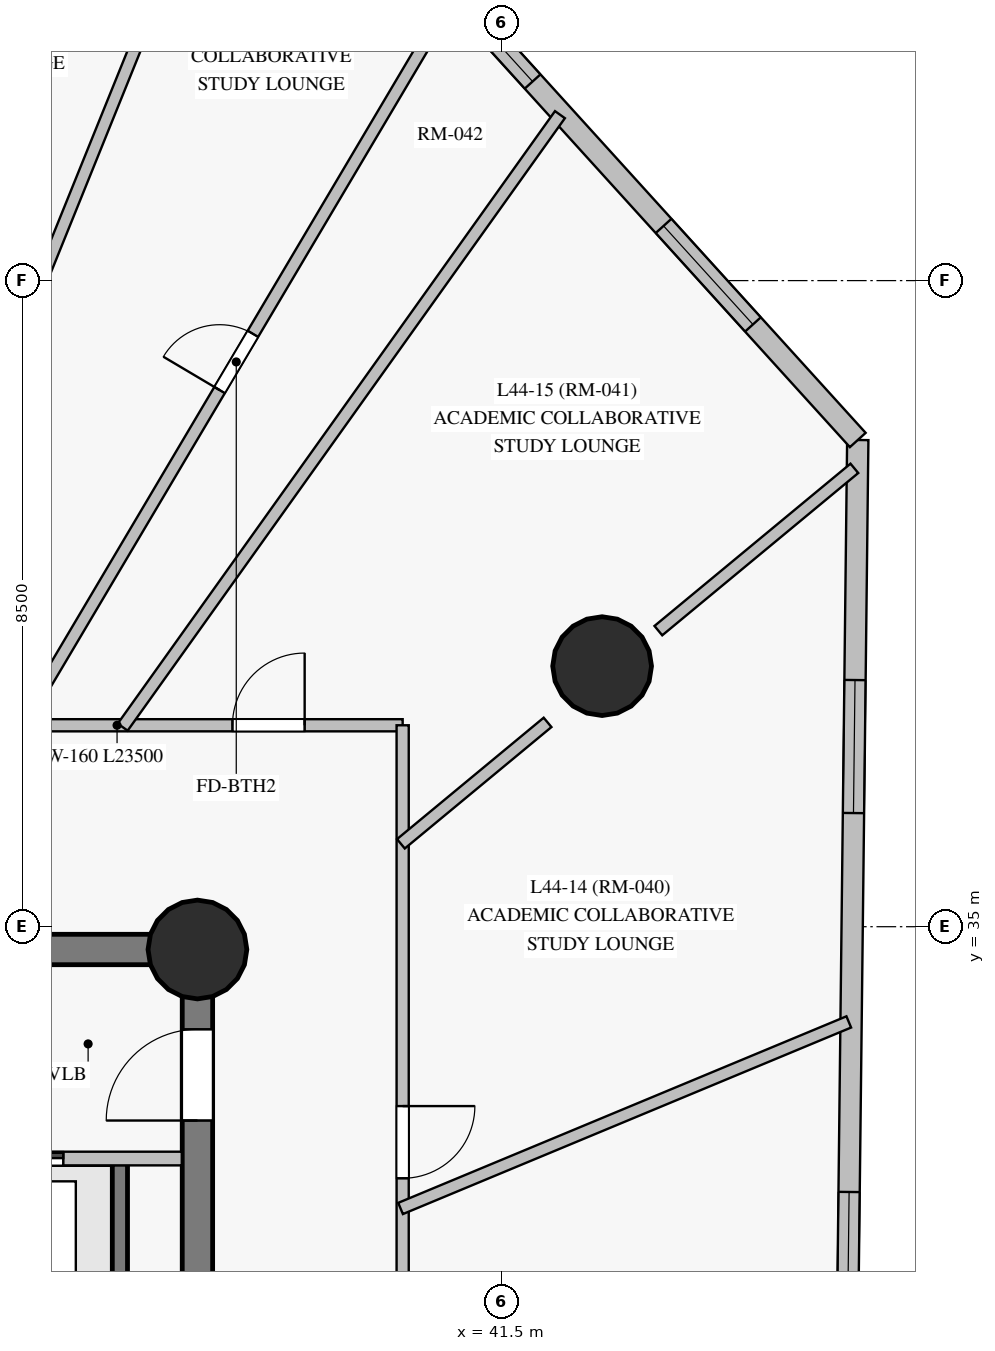
"""IFC4 building model, lengths in metres.
Left out: names, types, materials, properties, quantities, classifications, styles, units other than length and angle.
Written with IfcOpenShell. Run it as: python <this file> out.ifc"""

import sys

from ifc_helpers import new_model, si_unit, direction, frame, frame_2d, origin, origin_with_axes, origin_2d, place, context, subcontext, project, spatial, rectangle, circle, extrude, source, transform, mapped, element, fill, save


model = new_model("IFC4")
c1 = context("Model", 3, precision=1e-05, world=origin(), true_north=direction((0.0, 1.0)))
c2 = subcontext(c1, "Body", "Model", "MODEL_VIEW")
j1 = project(units=[si_unit("LENGTHUNIT", "METRE"), si_unit("PLANEANGLEUNIT", "RADIAN")], contexts=[c1])
p1 = place(None, origin())
s1 = spatial("IfcSite", under=j1, at=p1, CompositionType="ELEMENT")
p2 = place(p1, origin())
s2 = spatial("IfcBuilding", under=s1, at=p2, CompositionType="ELEMENT")
p3 = place(p2, frame((0.0, 0.0, 156.55)))
s3 = spatial("IfcBuildingStorey", under=s2, at=p3, CompositionType="ELEMENT", Elevation=156.55)
p4 = place(p3, frame((37.5, 18.3, 0.0), z_axis=(0.0, 0.0, 1.0), x_axis=(0.0, 1.0, 0.0)))
e1 = element("IfcWall", 1, at=p4, inside=s3, PredefinedType="SHEAR", context=c2, shape_type="SweptSolid", body=[
    extrude(rectangle(XDim=16.4, YDim=0.4, at=frame_2d((8.2, 0.0))), origin(), (0.0, 0.0, 1.0), 2.825),
])
p5 = place(p4, frame((14.15, 0.0, 0.0)))
e2 = element("IfcOpeningElement", 2, at=p5, cuts=e1, PredefinedType="OPENING", context=c2, shape_type="SweptSolid", body=[
    extrude(rectangle(XDim=1.2, YDim=2.15, at=frame_2d((0.6, 1.075))), frame((0.0, 0.21, 0.0), z_axis=(0.0, -1.0, 0.0), x_axis=(1.0, 0.0, 0.0)), (0.0, 0.0, 1.0), 0.42),
])
p6 = place(p3, frame((37.5, 34.7, 0.0), z_axis=(0.0, 0.0, 1.0), x_axis=(-1.0, 0.0, 0.0)))
e3 = element("IfcWall", 3, at=p6, inside=s3, PredefinedType="SHEAR", context=c2, shape_type="SweptSolid", body=[
    extrude(rectangle(XDim=10.95, YDim=0.4, at=frame_2d((5.475, 0.0))), origin(), (0.0, 0.0, 1.0), 2.825),
])
p7 = place(p6, frame((2.15, 0.0, 0.0)))
e4 = element("IfcOpeningElement", 4, at=p7, cuts=e3, PredefinedType="OPENING", context=c2, shape_type="SweptSolid", body=[
    extrude(rectangle(XDim=1.2, YDim=2.15, at=frame_2d((0.6, 1.075))), frame((0.0, 0.21, 0.0), z_axis=(0.0, -1.0, 0.0), x_axis=(1.0, 0.0, 0.0)), (0.0, 0.0, 1.0), 0.42),
])
p8 = place(p6, frame((6.35, 0.0, 0.0)))
e5 = element("IfcOpeningElement", 5, at=p8, cuts=e3, PredefinedType="OPENING", context=c2, shape_type="SweptSolid", body=[
    extrude(rectangle(XDim=1.1, YDim=2.15, at=frame_2d((0.55, 1.075))), frame((0.0, 0.21, 0.0), z_axis=(0.0, -1.0, 0.0), x_axis=(1.0, 0.0, 0.0)), (0.0, 0.0, 1.0), 0.42),
])
m1 = source(origin_with_axes(), c2, "Body", "SweptSolid", [
    extrude(circle(Radius=0.65, at=origin_2d()), origin(), (0.0, 0.0, 1.0), 3.05),
])
for number, where, z_axis, x_axis in (
    (6, (37.5, 34.7, 0.0), (0.0, 0.0, 1.0), (1.0, 0.0, 0.0)),
    (7, (42.824, 38.428, 0.0), (0.0, 0.0, 1.0), (1.0, 0.0, 0.0)),
):
    element("IfcColumn", number, at=place(p3, frame(where, z_axis=z_axis, x_axis=x_axis)), inside=s3, PredefinedType="COLUMN", context=c2, shape_type="MappedRepresentation", body=[
        mapped(m1, transform((0.0, 0.0, 0.0), scale=1.0)),
    ])
p9 = place(p3, frame((46.027, 27.477, 0.0), z_axis=(0.0, 0.0, 1.0), x_axis=(0.011517670731, 0.999933669431, 0.0)))
e8 = element("IfcWall", 8, at=p9, inside=s3, PredefinedType="SOLIDWALL", context=c2, shape_type="SweptSolid", body=[
    extrude(rectangle(XDim=13.927, YDim=0.28, at=frame_2d((6.963, 0.0))), origin(), (0.0, 0.0, 1.0), 2.825),
])
p10 = place(p9, frame((2.283, 0.0, 0.85)))
e9 = element("IfcOpeningElement", 9, at=p10, cuts=e8, PredefinedType="OPENING", context=c2, shape_type="SweptSolid", body=[
    extrude(rectangle(XDim=1.75, YDim=1.65, at=frame_2d((0.875, 0.825))), frame((0.0, 0.15, 0.0), z_axis=(0.0, -1.0, 0.0), x_axis=(1.0, 0.0, 0.0)), (0.0, 0.0, 1.0), 0.3),
])
p11 = place(p9, frame((9.018, 0.0, 0.85)))
e10 = element("IfcOpeningElement", 10, at=p11, cuts=e8, PredefinedType="OPENING", context=c2, shape_type="SweptSolid", body=[
    extrude(rectangle(XDim=1.75, YDim=1.65, at=frame_2d((0.875, 0.825))), frame((0.0, 0.15, 0.0), z_axis=(0.0, -1.0, 0.0), x_axis=(1.0, 0.0, 0.0)), (0.0, 0.0, 1.0), 0.3),
])
p12 = place(p3, frame((46.188, 41.403, 0.0), z_axis=(0.0, 0.0, 1.0), x_axis=(-0.671855500446, 0.740682243962, 0.0)))
e11 = element("IfcWall", 11, at=p12, inside=s3, PredefinedType="SOLIDWALL", context=c2, shape_type="SweptSolid", body=[
    extrude(rectangle(XDim=9.446, YDim=0.28, at=frame_2d((4.723, 0.0))), origin(), (0.0, 0.0, 1.0), 2.825),
])
p13 = place(p12, frame((2.053, 0.0, 0.85)))
e12 = element("IfcOpeningElement", 12, at=p13, cuts=e11, PredefinedType="OPENING", context=c2, shape_type="SweptSolid", body=[
    extrude(rectangle(XDim=1.75, YDim=1.65, at=frame_2d((0.875, 0.825))), frame((0.0, 0.15, 0.0), z_axis=(0.0, -1.0, 0.0), x_axis=(1.0, 0.0, 0.0)), (0.0, 0.0, 1.0), 0.3),
])
p14 = place(p12, frame((6.368, 0.0, 0.85)))
e13 = element("IfcOpeningElement", 13, at=p14, cuts=e11, PredefinedType="OPENING", context=c2, shape_type="SweptSolid", body=[
    extrude(rectangle(XDim=0.95, YDim=1.5, at=frame_2d((0.475, 0.75))), frame((0.0, 0.15, 0.0), z_axis=(0.0, -1.0, 0.0), x_axis=(1.0, 0.0, 0.0)), (0.0, 0.0, 1.0), 0.3),
])
p15 = place(p3, frame((36.48, 29.02, 0.0), z_axis=(0.0, 0.0, 1.0), x_axis=(0.0, 1.0, 0.0)))
e14 = element("IfcWall", 14, at=p15, inside=s3, PredefinedType="SHEAR", context=c2, shape_type="SweptSolid", body=[
    extrude(rectangle(XDim=2.86, YDim=0.2, at=frame_2d((1.43, 0.0))), origin(), (0.0, 0.0, 1.0), 2.825),
])
p16 = place(p3, frame((16.7, 37.65, 0.0), z_axis=(0.0, 0.0, 1.0), x_axis=(1.0, 0.0, 0.0)))
e15 = element("IfcWall", 15, at=p16, inside=s3, PredefinedType="PARTITIONING", context=c2, shape_type="SweptSolid", body=[
    extrude(rectangle(XDim=23.5, YDim=0.16, at=frame_2d((11.75, 0.0))), origin(), (0.0, 0.0, 1.0), 2.375),
])
p17 = place(p16, frame((21.26, 0.0, 0.0)))
e16 = element("IfcOpeningElement", 16, at=p17, cuts=e15, PredefinedType="OPENING", context=c2, shape_type="SweptSolid", body=[
    extrude(rectangle(XDim=0.95, YDim=2.15, at=frame_2d((0.475, 1.075))), frame((0.0, 0.09, 0.0), z_axis=(0.0, -1.0, 0.0), x_axis=(1.0, 0.0, 0.0)), (0.0, 0.0, 1.0), 0.18),
])
p18 = place(p16, frame((17.365, 0.0, 0.0)))
e17 = element("IfcOpeningElement", 17, at=p18, cuts=e15, PredefinedType="OPENING", context=c2, shape_type="SweptSolid", body=[
    extrude(rectangle(XDim=0.86, YDim=2.1, at=frame_2d((0.43, 1.05))), frame((0.0, 0.09, 0.0), z_axis=(0.0, -1.0, 0.0), x_axis=(1.0, 0.0, 0.0)), (0.0, 0.0, 1.0), 0.18),
])
p19 = place(p16, frame((15.16, 0.0, 0.0)))
e18 = element("IfcOpeningElement", 18, at=p19, cuts=e15, PredefinedType="OPENING", context=c2, shape_type="SweptSolid", body=[
    extrude(rectangle(XDim=0.95, YDim=2.15, at=frame_2d((0.475, 1.075))), frame((0.0, 0.09, 0.0), z_axis=(0.0, -1.0, 0.0), x_axis=(1.0, 0.0, 0.0)), (0.0, 0.0, 1.0), 0.18),
])
p20 = place(p16, frame((13.06, 0.0, 0.0)))
e19 = element("IfcOpeningElement", 19, at=p20, cuts=e15, PredefinedType="OPENING", context=c2, shape_type="SweptSolid", body=[
    extrude(rectangle(XDim=0.95, YDim=2.15, at=frame_2d((0.475, 1.075))), frame((0.0, 0.09, 0.0), z_axis=(0.0, -1.0, 0.0), x_axis=(1.0, 0.0, 0.0)), (0.0, 0.0, 1.0), 0.18),
])
p21 = place(p16, frame((10.973, 0.0, 0.0)))
e20 = element("IfcOpeningElement", 20, at=p21, cuts=e15, PredefinedType="OPENING", context=c2, shape_type="SweptSolid", body=[
    extrude(rectangle(XDim=0.95, YDim=2.15, at=frame_2d((0.475, 1.075))), frame((0.0, 0.09, 0.0), z_axis=(0.0, -1.0, 0.0), x_axis=(1.0, 0.0, 0.0)), (0.0, 0.0, 1.0), 0.18),
])
p22 = place(p16, frame((8.885, 0.0, 0.0)))
e21 = element("IfcOpeningElement", 21, at=p22, cuts=e15, PredefinedType="OPENING", context=c2, shape_type="SweptSolid", body=[
    extrude(rectangle(XDim=0.95, YDim=2.15, at=frame_2d((0.475, 1.075))), frame((0.0, 0.09, 0.0), z_axis=(0.0, -1.0, 0.0), x_axis=(1.0, 0.0, 0.0)), (0.0, 0.0, 1.0), 0.18),
])
p23 = place(p16, frame((6.51, 0.0, 0.0)))
e22 = element("IfcOpeningElement", 22, at=p23, cuts=e15, PredefinedType="OPENING", context=c2, shape_type="SweptSolid", body=[
    extrude(rectangle(XDim=0.95, YDim=2.15, at=frame_2d((0.475, 1.075))), frame((0.0, 0.09, 0.0), z_axis=(0.0, -1.0, 0.0), x_axis=(1.0, 0.0, 0.0)), (0.0, 0.0, 1.0), 0.18),
])
p24 = place(p16, frame((3.96, 0.0, 0.0)))
e23 = element("IfcOpeningElement", 23, at=p24, cuts=e15, PredefinedType="OPENING", context=c2, shape_type="SweptSolid", body=[
    extrude(rectangle(XDim=0.95, YDim=2.15, at=frame_2d((0.475, 1.075))), frame((0.0, 0.09, 0.0), z_axis=(0.0, -1.0, 0.0), x_axis=(1.0, 0.0, 0.0)), (0.0, 0.0, 1.0), 0.18),
])
p25 = place(p16, frame((2.364, 0.0, 0.0)))
e24 = element("IfcOpeningElement", 24, at=p25, cuts=e15, PredefinedType="OPENING", context=c2, shape_type="SweptSolid", body=[
    extrude(rectangle(XDim=0.95, YDim=2.15, at=frame_2d((0.475, 1.075))), frame((0.0, 0.09, 0.0), z_axis=(0.0, -1.0, 0.0), x_axis=(1.0, 0.0, 0.0)), (0.0, 0.0, 1.0), 0.18),
])
p26 = place(p3, frame((40.2, 37.65, 0.0), z_axis=(0.0, 0.0, 1.0), x_axis=(0.0, -1.0, 0.0)))
e25 = element("IfcWall", 25, at=p26, inside=s3, PredefinedType="PARTITIONING", context=c2, shape_type="SweptSolid", body=[
    extrude(rectangle(XDim=22.3, YDim=0.16, at=frame_2d((11.15, 0.0))), origin(), (0.0, 0.0, 1.0), 2.375),
])
p27 = place(p26, frame((16.25, 0.0, 0.0)))
e26 = element("IfcOpeningElement", 26, at=p27, cuts=e25, PredefinedType="OPENING", context=c2, shape_type="SweptSolid", body=[
    extrude(rectangle(XDim=0.95, YDim=2.15, at=frame_2d((0.475, 1.075))), frame((0.0, 0.09, 0.0), z_axis=(0.0, -1.0, 0.0), x_axis=(1.0, 0.0, 0.0)), (0.0, 0.0, 1.0), 0.18),
])
p28 = place(p26, frame((11.115, 0.0, 0.0)))
e27 = element("IfcOpeningElement", 27, at=p28, cuts=e25, PredefinedType="OPENING", context=c2, shape_type="SweptSolid", body=[
    extrude(rectangle(XDim=0.95, YDim=2.15, at=frame_2d((0.475, 1.075))), frame((0.0, 0.09, 0.0), z_axis=(0.0, -1.0, 0.0), x_axis=(1.0, 0.0, 0.0)), (0.0, 0.0, 1.0), 0.18),
])
p29 = place(p26, frame((7.33, 0.0, 0.0)))
e28 = element("IfcOpeningElement", 28, at=p29, cuts=e25, PredefinedType="OPENING", context=c2, shape_type="SweptSolid", body=[
    extrude(rectangle(XDim=0.95, YDim=2.15, at=frame_2d((0.475, 1.075))), frame((0.0, 0.09, 0.0), z_axis=(0.0, -1.0, 0.0), x_axis=(1.0, 0.0, 0.0)), (0.0, 0.0, 1.0), 0.18),
])
p30 = place(p26, frame((5.01, 0.0, 0.0)))
e29 = element("IfcOpeningElement", 29, at=p30, cuts=e25, PredefinedType="OPENING", context=c2, shape_type="SweptSolid", body=[
    extrude(rectangle(XDim=0.95, YDim=2.15, at=frame_2d((0.475, 1.075))), frame((0.0, 0.09, 0.0), z_axis=(0.0, -1.0, 0.0), x_axis=(1.0, 0.0, 0.0)), (0.0, 0.0, 1.0), 0.18),
])
p31 = place(p3, frame((33.059, 37.608, 0.0), z_axis=(0.0, 0.0, 1.0), x_axis=(0.375079467642, 0.926992660679, 0.0)))
e30 = element("IfcWall", 30, at=p31, inside=s3, PredefinedType="PARTITIONING", context=c2, shape_type="SweptSolid", body=[
    extrude(rectangle(XDim=11.904, YDim=0.16, at=frame_2d((5.952, 0.0))), origin(), (0.0, 0.0, 1.0), 2.825),
])
p32 = place(p3, frame((35.163, 37.624, 0.0), z_axis=(0.0, 0.0, 1.0), x_axis=(0.509838328303, 0.860270236026, 0.0)))
e31 = element("IfcWall", 31, at=p32, inside=s3, PredefinedType="PARTITIONING", context=c2, shape_type="SweptSolid", body=[
    extrude(rectangle(XDim=11.173, YDim=0.16, at=frame_2d((5.586, 0.0))), origin(), (0.0, 0.0, 1.0), 2.825),
])
p33 = place(p32, frame((5.156, 0.0, 0.0)))
e32 = element("IfcOpeningElement", 32, at=p33, cuts=e31, PredefinedType="OPENING", context=c2, shape_type="SweptSolid", body=[
    extrude(rectangle(XDim=0.86, YDim=2.04, at=frame_2d((0.43, 1.02))), frame((0.0, 0.09, 0.0), z_axis=(0.0, -1.0, 0.0), x_axis=(1.0, 0.0, 0.0)), (0.0, 0.0, 1.0), 0.18),
])
p34 = place(p3, frame((36.517, 37.625, 0.0), z_axis=(0.0, 0.0, 1.0), x_axis=(0.581053898372, 0.813865079228, 0.0)))
e33 = element("IfcWall", 33, at=p34, inside=s3, PredefinedType="PARTITIONING", context=c2, shape_type="SweptSolid", body=[
    extrude(rectangle(XDim=9.9, YDim=0.16, at=frame_2d((4.95, 0.0))), origin(), (0.0, 0.0, 1.0), 2.825),
])
p35 = place(p3, frame((40.172, 31.293, 0.0), z_axis=(0.0, 0.0, 1.0), x_axis=(0.923236300971, 0.38423265422, 0.0)))
e34 = element("IfcWall", 34, at=p35, inside=s3, PredefinedType="PARTITIONING", context=c2, shape_type="SweptSolid", body=[
    extrude(rectangle(XDim=6.387, YDim=0.16, at=frame_2d((3.193, 0.0))), origin(), (0.0, 0.0, 1.0), 2.825),
])
p36 = place(p3, frame((33.535, 31.95, 0.0), z_axis=(0.0, 0.0, 1.0), x_axis=(1.0, 0.0, 0.0)))
e35 = element("IfcWall", 35, at=p36, inside=s3, PredefinedType="PARTITIONING", context=c2, shape_type="SweptSolid", body=[
    extrude(rectangle(XDim=3.759, YDim=0.18, at=frame_2d((1.879, 0.0))), origin(), (0.0, 0.0, 1.0), 2.825),
])
p37 = place(p36, frame((0.9, 0.0, 0.0)))
e36 = element("IfcOpeningElement", 36, at=p37, cuts=e35, PredefinedType="OPENING", context=c2, shape_type="SweptSolid", body=[
    extrude(rectangle(XDim=1.3, YDim=2.2, at=frame_2d((0.65, 1.1))), frame((0.0, 0.1, 0.0), z_axis=(0.0, -1.0, 0.0), x_axis=(1.0, 0.0, 0.0)), (0.0, 0.0, 1.0), 0.2),
])
p38 = place(p3, frame((43.564, 38.895, 0.0), z_axis=(0.0, 0.0, 1.0), x_axis=(0.770279444243, 0.637706498145, 0.0)))
e37 = element("IfcWall", 37, at=p38, inside=s3, PredefinedType="PARTITIONING", context=c2, shape_type="SweptSolid", body=[
    extrude(rectangle(XDim=3.348, YDim=0.16, at=frame_2d((1.674, 0.0))), origin(), (0.0, 0.0, 1.0), 2.825),
])
p39 = place(p3, frame((40.177, 36.09, 0.0), z_axis=(0.0, 0.0, 1.0), x_axis=(0.770222621375, 0.637775127708, 0.0)))
e38 = element("IfcWall", 38, at=p39, inside=s3, PredefinedType="PARTITIONING", context=c2, shape_type="SweptSolid", body=[
    extrude(rectangle(XDim=2.505, YDim=0.16, at=frame_2d((1.252, 0.0))), origin(), (0.0, 0.0, 1.0), 2.275),
])
m2 = source(origin_with_axes(), c2, "Body", "SweptSolid", [
    extrude(rectangle(XDim=1.75, YDim=1.65, at=frame_2d((0.875, 0.825))), frame((0.0, 0.03, 0.0), z_axis=(0.0, -1.0, 0.0), x_axis=(1.0, 0.0, 0.0)), (0.0, 0.0, 1.0), 0.06),
])
p40 = place(p10, origin())
e39 = element("IfcWindow", 39, at=p40, inside=s3, PartitioningType="SINGLE_PANEL", PredefinedType="WINDOW", context=c2, shape_type="MappedRepresentation", body=[
    mapped(m2, transform((0.0, 0.0, 0.0), scale=1.0)),
])
fill(e9, e39)
p41 = place(p11, origin())
e40 = element("IfcWindow", 40, at=p41, inside=s3, PartitioningType="SINGLE_PANEL", PredefinedType="WINDOW", context=c2, shape_type="MappedRepresentation", body=[
    mapped(m2, transform((0.0, 0.0, 0.0), scale=1.0)),
])
fill(e10, e40)
p42 = place(p13, origin())
e41 = element("IfcWindow", 41, at=p42, inside=s3, PartitioningType="SINGLE_PANEL", PredefinedType="WINDOW", context=c2, shape_type="MappedRepresentation", body=[
    mapped(m2, transform((0.0, 0.0, 0.0), scale=1.0)),
])
fill(e12, e41)
m3 = source(origin_with_axes(), c2, "Body", "SweptSolid", [
    extrude(rectangle(XDim=0.95, YDim=1.5, at=frame_2d((0.475, 0.75))), frame((0.0, 0.03, 0.0), z_axis=(0.0, -1.0, 0.0), x_axis=(1.0, 0.0, 0.0)), (0.0, 0.0, 1.0), 0.06),
])
p43 = place(p14, origin())
e42 = element("IfcWindow", 42, at=p43, inside=s3, PartitioningType="SINGLE_PANEL", PredefinedType="WINDOW", context=c2, shape_type="MappedRepresentation", body=[
    mapped(m3, transform((0.0, 0.0, 0.0), scale=1.0)),
])
fill(e13, e42)
m4 = source(origin_with_axes(), c2, "Body", "SweptSolid", [
    extrude(rectangle(XDim=1.2, YDim=2.15, at=frame_2d((0.6, 1.075))), frame((0.0, 0.025, 0.0), z_axis=(0.0, -1.0, 0.0), x_axis=(1.0, 0.0, 0.0)), (0.0, 0.0, 1.0), 0.05),
])
p44 = place(p5, origin())
e43 = element("IfcDoor", 43, at=p44, inside=s3, OperationType="SINGLE_SWING_LEFT", PredefinedType="DOOR", context=c2, shape_type="MappedRepresentation", body=[
    mapped(m4, transform((0.0, 0.0, 0.0), scale=1.0)),
])
fill(e2, e43)
m5 = source(origin_with_axes(), c2, "Body", "SweptSolid", [
    extrude(rectangle(XDim=1.3, YDim=2.2, at=frame_2d((0.65, 1.1))), frame((0.0, 0.025, 0.0), z_axis=(0.0, -1.0, 0.0), x_axis=(1.0, 0.0, 0.0)), (0.0, 0.0, 1.0), 0.05),
])
p45 = place(p37, origin())
e44 = element("IfcDoor", 44, at=p45, inside=s3, OperationType="SLIDING_TO_LEFT", PredefinedType="DOOR", context=c2, shape_type="MappedRepresentation", body=[
    mapped(m5, transform((0.0, 0.0, 0.0), scale=1.0)),
])
fill(e36, e44)
m6 = source(origin_with_axes(), c2, "Body", "SweptSolid", [
    extrude(rectangle(XDim=0.95, YDim=2.15, at=frame_2d((0.475, 1.075))), frame((0.0, 0.025, 0.0), z_axis=(0.0, -1.0, 0.0), x_axis=(1.0, 0.0, 0.0)), (0.0, 0.0, 1.0), 0.05),
])
p46 = place(p30, origin())
e45 = element("IfcDoor", 45, at=p46, inside=s3, OperationType="SINGLE_SWING_LEFT", PredefinedType="DOOR", context=c2, shape_type="MappedRepresentation", body=[
    mapped(m6, transform((0.0, 0.0, 0.0), scale=1.0)),
])
fill(e29, e45)
p47 = place(p17, origin())
e46 = element("IfcDoor", 46, at=p47, inside=s3, OperationType="SINGLE_SWING_RIGHT", PredefinedType="DOOR", context=c2, shape_type="MappedRepresentation", body=[
    mapped(m6, transform((0.0, 0.0, 0.0), scale=1.0)),
])
fill(e16, e46)
m7 = source(origin_with_axes(), c2, "Body", "SweptSolid", [
    extrude(rectangle(XDim=0.86, YDim=2.04, at=frame_2d((0.43, 1.02))), frame((0.0, 0.025, 0.0), z_axis=(0.0, -1.0, 0.0), x_axis=(1.0, 0.0, 0.0)), (0.0, 0.0, 1.0), 0.05),
])
p48 = place(p33, origin())
e47 = element("IfcDoor", 47, at=p48, inside=s3, OperationType="SINGLE_SWING_LEFT", PredefinedType="DOOR", context=c2, shape_type="MappedRepresentation", body=[
    mapped(m7, transform((0.0, 0.0, 0.0), scale=1.0)),
])
fill(e32, e47)
save(model, sys.argv[1])
